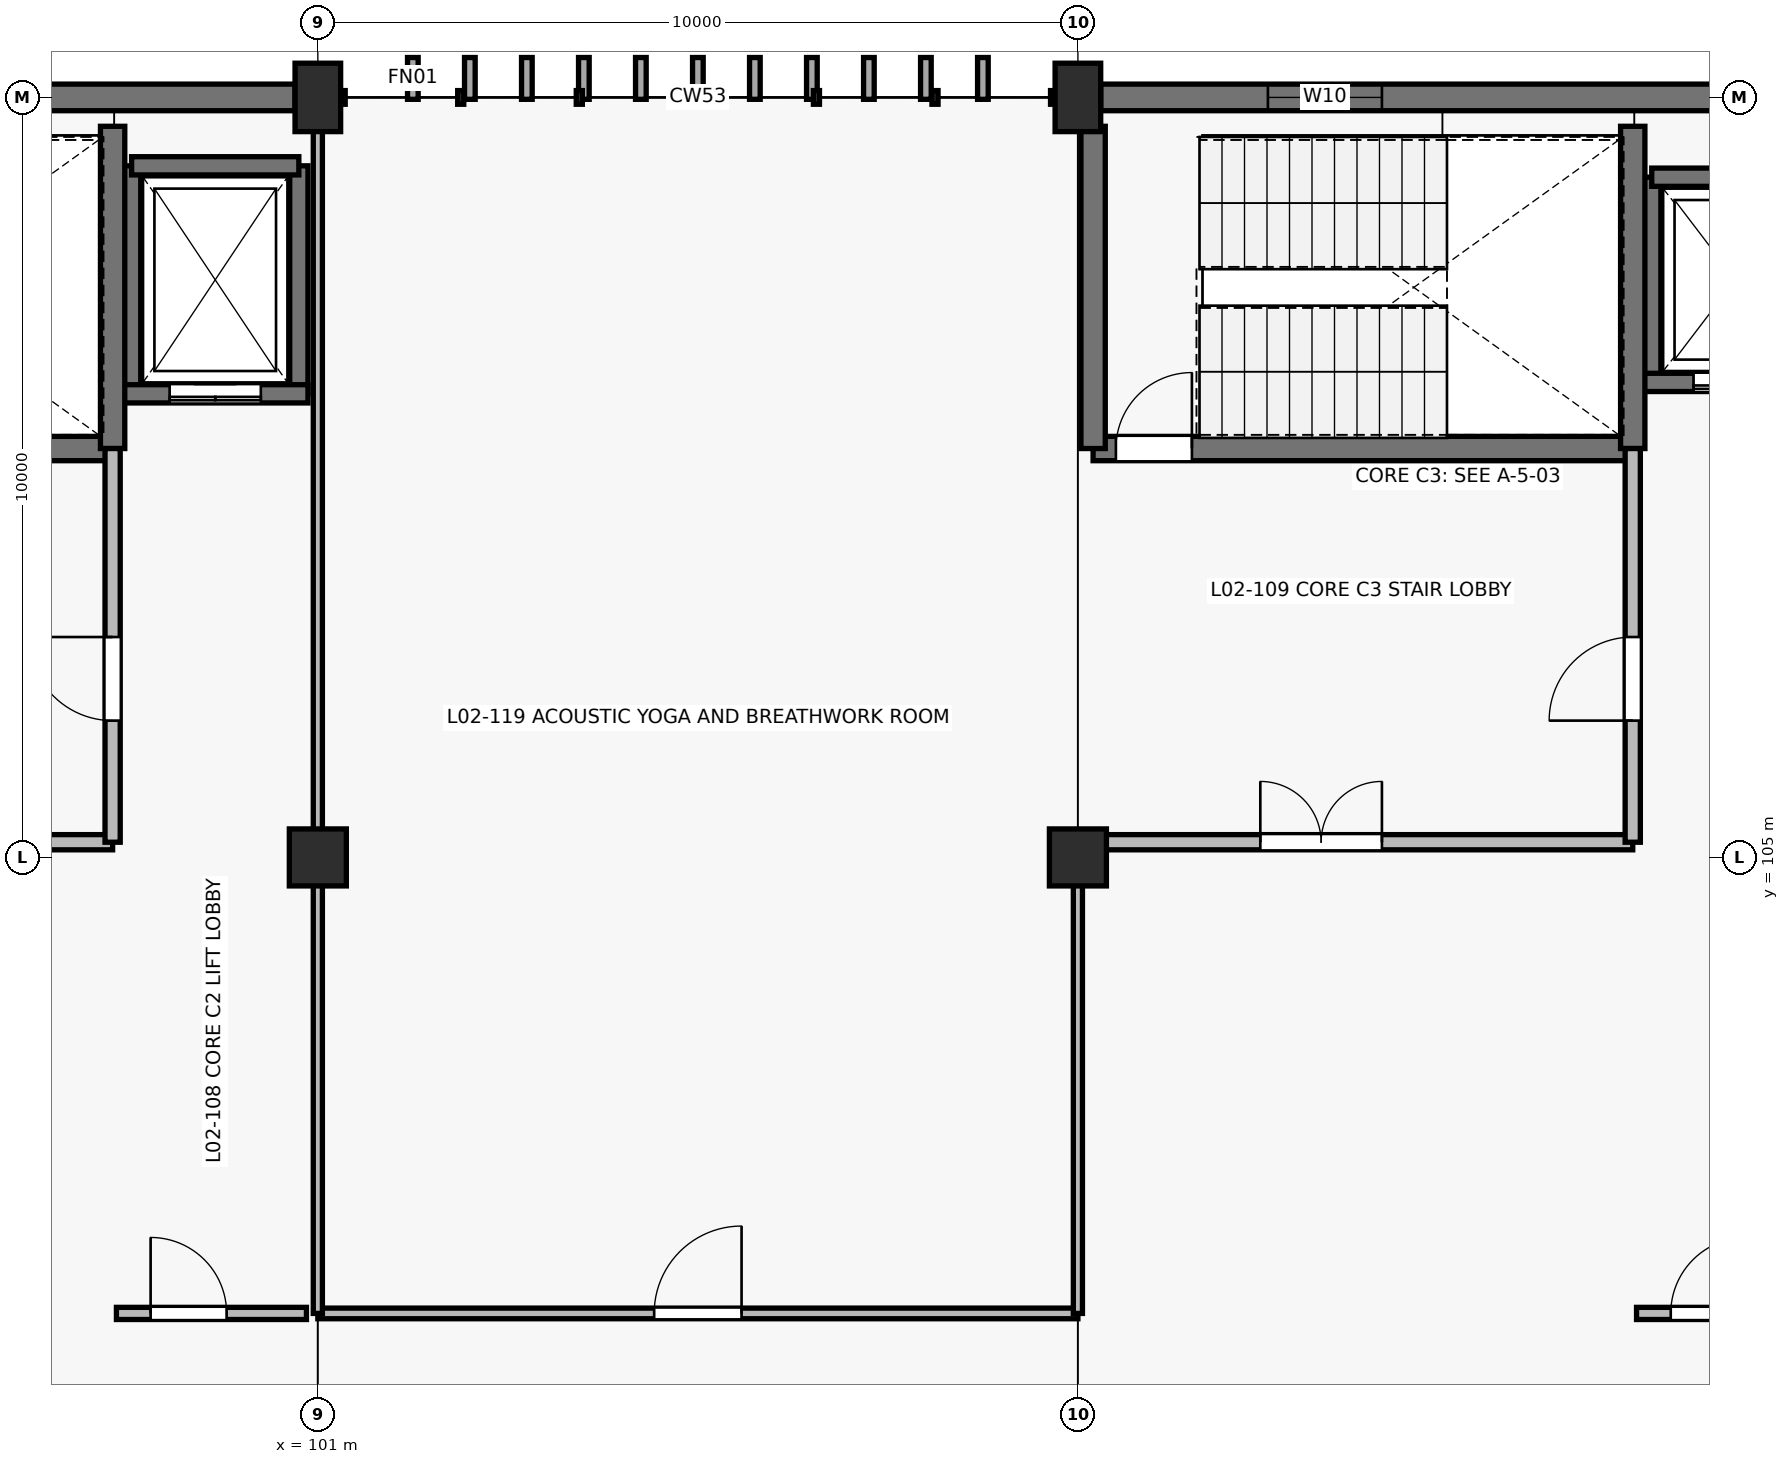
"""IFC4 building model, lengths in metres.
Left out: names, types, materials, properties, quantities, classifications, styles, units other than length and angle.
Written with IfcOpenShell. Run it as: python <this file> out.ifc"""

import sys

from ifc_helpers import new_model, si_unit, direction, frame, frame_2d, origin, origin_2d, place, context, subcontext, project, spatial, rectangle, extrude, element, fill, save


model = new_model("IFC4")
c1 = context("Model", 3, precision=1e-05, world=origin(), true_north=direction((0.0, 1.0)))
c2 = subcontext(c1, "Body", "Model", "MODEL_VIEW")
j1 = project(units=[si_unit("LENGTHUNIT", "METRE"), si_unit("PLANEANGLEUNIT", "RADIAN")], contexts=[c1])
p1 = place(None, origin())
s1 = spatial("IfcSite", under=j1, at=p1, CompositionType="ELEMENT")
p2 = place(p1, origin())
s2 = spatial("IfcBuilding", under=s1, at=p2, CompositionType="ELEMENT")
p3 = place(p2, frame((0.0, 0.0, 9.0)))
s3 = spatial("IfcBuildingStorey", under=s2, at=p3, CompositionType="ELEMENT", Elevation=9.0)
p4 = place(p3, frame((101.0, 105.0, 0.0), z_axis=(0.0, 0.0, 1.0), x_axis=(1.0, 0.0, 0.0)))
e1 = element("IfcColumn", 1, at=p4, inside=s3, PredefinedType="COLUMN", context=c2, shape_type="SweptSolid", body=[
    extrude(rectangle(XDim=0.75, YDim=0.75, at=origin_2d()), origin(), (0.0, 0.0, 1.0), 4.2),
])
p5 = place(p3, frame((101.0, 115.0, 0.0), z_axis=(0.0, 0.0, 1.0), x_axis=(1.0, 0.0, 0.0)))
e2 = element("IfcColumn", 2, at=p5, inside=s3, PredefinedType="COLUMN", context=c2, shape_type="SweptSolid", body=[
    extrude(rectangle(XDim=0.6, YDim=0.9, at=origin_2d()), origin(), (0.0, 0.0, 1.0), 4.2),
])
p6 = place(p3, frame((111.0, 105.0, 0.0), z_axis=(0.0, 0.0, 1.0), x_axis=(1.0, 0.0, 0.0)))
e3 = element("IfcColumn", 3, at=p6, inside=s3, PredefinedType="COLUMN", context=c2, shape_type="SweptSolid", body=[
    extrude(rectangle(XDim=0.75, YDim=0.75, at=origin_2d()), origin(), (0.0, 0.0, 1.0), 4.2),
])
p7 = place(p3, frame((111.0, 115.0, 0.0), z_axis=(0.0, 0.0, 1.0), x_axis=(1.0, 0.0, 0.0)))
e4 = element("IfcColumn", 4, at=p7, inside=s3, PredefinedType="COLUMN", context=c2, shape_type="SweptSolid", body=[
    extrude(rectangle(XDim=0.6, YDim=0.9, at=origin_2d()), origin(), (0.0, 0.0, 1.0), 4.2),
])
p8 = place(p3, frame((91.3, 115.0, 0.0), z_axis=(0.0, 0.0, 1.0), x_axis=(1.0, 0.0, 0.0)))
e5 = element("IfcWall", 5, at=p8, inside=s3, PredefinedType="SOLIDWALL", context=c2, shape_type="SweptSolid", body=[
    extrude(rectangle(XDim=9.4, YDim=0.35, at=frame_2d((4.7, 0.0))), origin(), (0.0, 0.0, 1.0), 4.2),
])
p9 = place(p8, frame((2.2, 0.0, 1.0)))
e6 = element("IfcOpeningElement", 6, at=p9, cuts=e5, PredefinedType="OPENING", context=c2, shape_type="SweptSolid", body=[
    extrude(rectangle(XDim=2.7, YDim=1.5, at=frame_2d((1.35, 0.75))), frame((0.0, 0.185, 0.0), z_axis=(0.0, -1.0, 0.0), x_axis=(1.0, 0.0, 0.0)), (0.0, 0.0, 1.0), 0.37),
])
p10 = place(p3, frame((111.3, 115.0, 0.0), z_axis=(0.0, 0.0, 1.0), x_axis=(1.0, 0.0, 0.0)))
e7 = element("IfcWall", 7, at=p10, inside=s3, PredefinedType="SOLIDWALL", context=c2, shape_type="SweptSolid", body=[
    extrude(rectangle(XDim=9.4, YDim=0.35, at=frame_2d((4.7, 0.0))), origin(), (0.0, 0.0, 1.0), 4.2),
])
p11 = place(p10, frame((2.2, 0.0, 1.0)))
e8 = element("IfcOpeningElement", 8, at=p11, cuts=e7, PredefinedType="OPENING", context=c2, shape_type="SweptSolid", body=[
    extrude(rectangle(XDim=1.5, YDim=1.8, at=frame_2d((0.75, 0.9))), frame((0.0, 0.185, 0.0), z_axis=(0.0, -1.0, 0.0), x_axis=(1.0, 0.0, 0.0)), (0.0, 0.0, 1.0), 0.37),
])
for number, where, z_axis, x_axis in (
    (9, (98.55, 111.1, 0.0), (0.0, 0.0, 1.0), (0.0, 1.0, 0.0)),
    (10, (100.75, 114.1, 0.0), (0.0, 0.0, 1.0), (0.0, -1.0, 0.0)),
):
    element("IfcWall", number, at=place(p3, frame(where, z_axis=z_axis, x_axis=x_axis)), inside=s3, PredefinedType="SHEAR", context=c2, shape_type="SweptSolid", body=[
        extrude(rectangle(XDim=3.0, YDim=0.24, at=frame_2d((1.5, 0.0))), origin(), (0.0, 0.0, 1.0), 4.2),
    ])
p12 = place(p3, frame((98.55, 114.1, 0.0), z_axis=(0.0, 0.0, 1.0), x_axis=(1.0, 0.0, 0.0)))
e11 = element("IfcWall", 11, at=p12, inside=s3, PredefinedType="SHEAR", context=c2, shape_type="SweptSolid", body=[
    extrude(rectangle(XDim=2.2, YDim=0.24, at=frame_2d((1.1, 0.0))), origin(), (0.0, 0.0, 1.0), 4.2),
])
p13 = place(p3, frame((100.87, 111.1, 0.0), z_axis=(0.0, 0.0, 1.0), x_axis=(-1.0, 0.0, 0.0)))
e12 = element("IfcWall", 12, at=p13, inside=s3, PredefinedType="SHEAR", context=c2, shape_type="SweptSolid", body=[
    extrude(rectangle(XDim=2.44, YDim=0.24, at=frame_2d((1.22, 0.0))), origin(), (0.0, 0.0, 1.0), 4.2),
])
p14 = place(p13, frame((0.62, 0.0, 0.0)))
e13 = element("IfcOpeningElement", 13, at=p14, cuts=e12, PredefinedType="OPENING", context=c2, shape_type="SweptSolid", body=[
    extrude(rectangle(XDim=1.2, YDim=2.15, at=frame_2d((0.6, 1.075))), frame((0.0, 0.13, 0.0), z_axis=(0.0, -1.0, 0.0), x_axis=(1.0, 0.0, 0.0)), (0.0, 0.0, 1.0), 0.26),
])
p15 = place(p3, frame((118.55, 111.25, 0.0), z_axis=(0.0, 0.0, 1.0), x_axis=(0.0, 1.0, 0.0)))
e14 = element("IfcWall", 14, at=p15, inside=s3, PredefinedType="SHEAR", context=c2, shape_type="SweptSolid", body=[
    extrude(rectangle(XDim=2.7, YDim=0.24, at=frame_2d((1.35, 0.0))), origin(), (0.0, 0.0, 1.0), 4.2),
])
p16 = place(p3, frame((118.55, 113.95, 0.0), z_axis=(0.0, 0.0, 1.0), x_axis=(1.0, 0.0, 0.0)))
e15 = element("IfcWall", 15, at=p16, inside=s3, PredefinedType="SHEAR", context=c2, shape_type="SweptSolid", body=[
    extrude(rectangle(XDim=2.2, YDim=0.24, at=frame_2d((1.1, 0.0))), origin(), (0.0, 0.0, 1.0), 4.2),
])
p17 = place(p3, frame((120.87, 111.25, 0.0), z_axis=(0.0, 0.0, 1.0), x_axis=(-1.0, 0.0, 0.0)))
e16 = element("IfcWall", 16, at=p17, inside=s3, PredefinedType="SHEAR", context=c2, shape_type="SweptSolid", body=[
    extrude(rectangle(XDim=2.44, YDim=0.24, at=frame_2d((1.22, 0.0))), origin(), (0.0, 0.0, 1.0), 4.2),
])
p18 = place(p17, frame((0.67, 0.0, 0.0)))
e17 = element("IfcOpeningElement", 17, at=p18, cuts=e16, PredefinedType="OPENING", context=c2, shape_type="SweptSolid", body=[
    extrude(rectangle(XDim=1.1, YDim=2.15, at=frame_2d((0.55, 1.075))), frame((0.0, 0.13, 0.0), z_axis=(0.0, -1.0, 0.0), x_axis=(1.0, 0.0, 0.0)), (0.0, 0.0, 1.0), 0.26),
])
p19 = place(p3, frame((91.2, 110.38, 0.0), z_axis=(0.0, 0.0, 1.0), x_axis=(1.0, 0.0, 0.0)))
e18 = element("IfcWall", 18, at=p19, inside=s3, PredefinedType="SHEAR", context=c2, shape_type="SweptSolid", body=[
    extrude(rectangle(XDim=7.1, YDim=0.32, at=frame_2d((3.55, 0.0))), origin(), (0.0, 0.0, 1.0), 4.2),
])
p20 = place(p19, frame((0.3, 0.0, 0.0)))
e19 = element("IfcOpeningElement", 19, at=p20, cuts=e18, PredefinedType="OPENING", context=c2, shape_type="SweptSolid", body=[
    extrude(rectangle(XDim=1.0, YDim=2.15, at=frame_2d((0.5, 1.075))), frame((0.0, 0.17, 0.0), z_axis=(0.0, -1.0, 0.0), x_axis=(1.0, 0.0, 0.0)), (0.0, 0.0, 1.0), 0.34),
])
p21 = place(p3, frame((98.3, 110.38, 0.0), z_axis=(0.0, 0.0, 1.0), x_axis=(0.0, 1.0, 0.0)))
e20 = element("IfcWall", 20, at=p21, inside=s3, PredefinedType="SHEAR", context=c2, shape_type="SweptSolid", body=[
    extrude(rectangle(XDim=4.24, YDim=0.32, at=frame_2d((2.12, 0.0))), origin(), (0.0, 0.0, 1.0), 4.2),
])
p22 = place(p3, frame((91.2, 105.2, 0.0), z_axis=(0.0, 0.0, 1.0), x_axis=(1.0, 0.0, 0.0)))
e21 = element("IfcWall", 21, at=p22, inside=s3, PredefinedType="PARTITIONING", context=c2, shape_type="SweptSolid", body=[
    extrude(rectangle(XDim=7.1, YDim=0.2, at=frame_2d((3.55, 0.0))), origin(), (0.0, 0.0, 1.0), 2.905),
])
p23 = place(p22, frame((2.2, 0.0, 0.0)))
e22 = element("IfcOpeningElement", 22, at=p23, cuts=e21, PredefinedType="OPENING", context=c2, shape_type="SweptSolid", body=[
    extrude(rectangle(XDim=1.6, YDim=2.2, at=frame_2d((0.8, 1.1))), frame((0.0, 0.11, 0.0), z_axis=(0.0, -1.0, 0.0), x_axis=(1.0, 0.0, 0.0)), (0.0, 0.0, 1.0), 0.22),
])
p24 = place(p3, frame((98.3, 105.2, 0.0), z_axis=(0.0, 0.0, 1.0), x_axis=(0.0, 1.0, 0.0)))
e23 = element("IfcWall", 23, at=p24, inside=s3, PredefinedType="PARTITIONING", context=c2, shape_type="SweptSolid", body=[
    extrude(rectangle(XDim=5.18, YDim=0.2, at=frame_2d((2.59, 0.0))), origin(), (0.0, 0.0, 1.0), 3.005),
])
p25 = place(p24, frame((1.6, 0.0, 0.0)))
e24 = element("IfcOpeningElement", 24, at=p25, cuts=e23, PredefinedType="OPENING", context=c2, shape_type="SweptSolid", body=[
    extrude(rectangle(XDim=1.1, YDim=2.15, at=frame_2d((0.55, 1.075))), frame((0.0, 0.11, 0.0), z_axis=(0.0, -1.0, 0.0), x_axis=(1.0, 0.0, 0.0)), (0.0, 0.0, 1.0), 0.22),
])
p26 = place(p3, frame((98.35, 99.0, 0.0), z_axis=(0.0, 0.0, 1.0), x_axis=(1.0, 0.0, 0.0)))
e25 = element("IfcWall", 25, at=p26, inside=s3, PredefinedType="PARTITIONING", context=c2, shape_type="SweptSolid", body=[
    extrude(rectangle(XDim=2.5, YDim=0.16, at=frame_2d((1.25, 0.0))), origin(), (0.0, 0.0, 1.0), 2.905),
])
p27 = place(p26, frame((0.45, 0.0, 0.0)))
e26 = element("IfcOpeningElement", 26, at=p27, cuts=e25, PredefinedType="OPENING", context=c2, shape_type="SweptSolid", body=[
    extrude(rectangle(XDim=1.0, YDim=2.15, at=frame_2d((0.5, 1.075))), frame((0.0, 0.09, 0.0), z_axis=(0.0, -1.0, 0.0), x_axis=(1.0, 0.0, 0.0)), (0.0, 0.0, 1.0), 0.18),
])
p28 = place(p3, frame((111.2, 110.38, 0.0), z_axis=(0.0, 0.0, 1.0), x_axis=(1.0, 0.0, 0.0)))
e27 = element("IfcWall", 27, at=p28, inside=s3, PredefinedType="SHEAR", context=c2, shape_type="SweptSolid", body=[
    extrude(rectangle(XDim=7.1, YDim=0.32, at=frame_2d((3.55, 0.0))), origin(), (0.0, 0.0, 1.0), 4.2),
])
p29 = place(p28, frame((0.3, 0.0, 0.0)))
e28 = element("IfcOpeningElement", 28, at=p29, cuts=e27, PredefinedType="OPENING", context=c2, shape_type="SweptSolid", body=[
    extrude(rectangle(XDim=1.0, YDim=2.15, at=frame_2d((0.5, 1.075))), frame((0.0, 0.17, 0.0), z_axis=(0.0, -1.0, 0.0), x_axis=(1.0, 0.0, 0.0)), (0.0, 0.0, 1.0), 0.34),
])
for number, where, z_axis, x_axis in (
    (29, (118.3, 110.38, 0.0), (0.0, 0.0, 1.0), (0.0, 1.0, 0.0)),
    (30, (111.2, 114.62, 0.0), (0.0, 0.0, 1.0), (0.0, -1.0, 0.0)),
):
    element("IfcWall", number, at=place(p3, frame(where, z_axis=z_axis, x_axis=x_axis)), inside=s3, PredefinedType="SHEAR", context=c2, shape_type="SweptSolid", body=[
        extrude(rectangle(XDim=4.24, YDim=0.32, at=frame_2d((2.12, 0.0))), origin(), (0.0, 0.0, 1.0), 4.2),
    ])
p30 = place(p3, frame((111.2, 105.2, 0.0), z_axis=(0.0, 0.0, 1.0), x_axis=(1.0, 0.0, 0.0)))
e31 = element("IfcWall", 31, at=p30, inside=s3, PredefinedType="PARTITIONING", context=c2, shape_type="SweptSolid", body=[
    extrude(rectangle(XDim=7.1, YDim=0.2, at=frame_2d((3.55, 0.0))), origin(), (0.0, 0.0, 1.0), 2.905),
])
p31 = place(p30, frame((2.2, 0.0, 0.0)))
e32 = element("IfcOpeningElement", 32, at=p31, cuts=e31, PredefinedType="OPENING", context=c2, shape_type="SweptSolid", body=[
    extrude(rectangle(XDim=1.6, YDim=2.2, at=frame_2d((0.8, 1.1))), frame((0.0, 0.11, 0.0), z_axis=(0.0, -1.0, 0.0), x_axis=(1.0, 0.0, 0.0)), (0.0, 0.0, 1.0), 0.22),
])
p32 = place(p3, frame((118.3, 105.2, 0.0), z_axis=(0.0, 0.0, 1.0), x_axis=(0.0, 1.0, 0.0)))
e33 = element("IfcWall", 33, at=p32, inside=s3, PredefinedType="PARTITIONING", context=c2, shape_type="SweptSolid", body=[
    extrude(rectangle(XDim=5.18, YDim=0.2, at=frame_2d((2.59, 0.0))), origin(), (0.0, 0.0, 1.0), 3.005),
])
p33 = place(p32, frame((1.6, 0.0, 0.0)))
e34 = element("IfcOpeningElement", 34, at=p33, cuts=e33, PredefinedType="OPENING", context=c2, shape_type="SweptSolid", body=[
    extrude(rectangle(XDim=1.1, YDim=2.15, at=frame_2d((0.55, 1.075))), frame((0.0, 0.11, 0.0), z_axis=(0.0, -1.0, 0.0), x_axis=(1.0, 0.0, 0.0)), (0.0, 0.0, 1.0), 0.22),
])
p34 = place(p3, frame((118.35, 99.0, 0.0), z_axis=(0.0, 0.0, 1.0), x_axis=(1.0, 0.0, 0.0)))
e35 = element("IfcWall", 35, at=p34, inside=s3, PredefinedType="PARTITIONING", context=c2, shape_type="SweptSolid", body=[
    extrude(rectangle(XDim=2.5, YDim=0.16, at=frame_2d((1.25, 0.0))), origin(), (0.0, 0.0, 1.0), 2.905),
])
p35 = place(p34, frame((0.45, 0.0, 0.0)))
e36 = element("IfcOpeningElement", 36, at=p35, cuts=e35, PredefinedType="OPENING", context=c2, shape_type="SweptSolid", body=[
    extrude(rectangle(XDim=1.0, YDim=2.15, at=frame_2d((0.5, 1.075))), frame((0.0, 0.09, 0.0), z_axis=(0.0, -1.0, 0.0), x_axis=(1.0, 0.0, 0.0)), (0.0, 0.0, 1.0), 0.18),
])
p36 = place(p3, frame((101.0, 99.0, 0.0), z_axis=(0.0, 0.0, 1.0), x_axis=(1.0, 0.0, 0.0)))
e37 = element("IfcWall", 37, at=p36, inside=s3, PredefinedType="PARTITIONING", context=c2, shape_type="SweptSolid", body=[
    extrude(rectangle(XDim=10.0, YDim=0.14, at=frame_2d((5.0, 0.0))), origin(), (0.0, 0.0, 1.0), 2.905),
])
p37 = place(p36, frame((4.425, 0.0, 0.0)))
e38 = element("IfcOpeningElement", 38, at=p37, cuts=e37, PredefinedType="OPENING", context=c2, shape_type="SweptSolid", body=[
    extrude(rectangle(XDim=1.15, YDim=2.15, at=frame_2d((0.575, 1.075))), frame((0.0, 0.08, 0.0), z_axis=(0.0, -1.0, 0.0), x_axis=(1.0, 0.0, 0.0)), (0.0, 0.0, 1.0), 0.16),
])
p38 = place(p3, frame((101.0, 99.0, 0.0), z_axis=(0.0, 0.0, 1.0), x_axis=(0.0, 1.0, 0.0)))
e39 = element("IfcWall", 39, at=p38, inside=s3, PredefinedType="PARTITIONING", context=c2, shape_type="SweptSolid", body=[
    extrude(rectangle(XDim=15.75, YDim=0.12, at=frame_2d((7.875, 0.0))), origin(), (0.0, 0.0, 1.0), 2.905),
])
p39 = place(p3, frame((111.0, 99.0, 0.0), z_axis=(0.0, 0.0, 1.0), x_axis=(0.0, 1.0, 0.0)))
e40 = element("IfcWall", 40, at=p39, inside=s3, PredefinedType="PARTITIONING", context=c2, shape_type="SweptSolid", body=[
    extrude(rectangle(XDim=6.2, YDim=0.12, at=frame_2d((3.1, 0.0))), origin(), (0.0, 0.0, 1.0), 2.905),
])
p40 = place(p11, origin())
e41 = element("IfcWindow", 41, at=p40, inside=s3, PartitioningType="SINGLE_PANEL", PredefinedType="WINDOW", context=c2, shape_type="SweptSolid", body=[
    extrude(rectangle(XDim=1.5, YDim=1.8, at=frame_2d((0.75, 0.9))), frame((0.0, 0.03, 0.0), z_axis=(0.0, -1.0, 0.0), x_axis=(1.0, 0.0, 0.0)), (0.0, 0.0, 1.0), 0.06),
])
fill(e8, e41)
p41 = place(p14, origin())
e42 = element("IfcDoor", 42, at=p41, inside=s3, OperationType="DOUBLE_DOOR_SLIDING", PredefinedType="USERDEFINED", context=c2, shape_type="SweptSolid", body=[
    extrude(rectangle(XDim=1.2, YDim=2.15, at=frame_2d((0.6, 1.075))), frame((0.0, 0.025, 0.0), z_axis=(0.0, -1.0, 0.0), x_axis=(1.0, 0.0, 0.0)), (0.0, 0.0, 1.0), 0.05),
])
fill(e13, e42)
p42 = place(p18, origin())
e43 = element("IfcDoor", 43, at=p42, inside=s3, OperationType="DOUBLE_DOOR_SLIDING", PredefinedType="USERDEFINED", context=c2, shape_type="SweptSolid", body=[
    extrude(rectangle(XDim=1.1, YDim=2.15, at=frame_2d((0.55, 1.075))), frame((0.0, 0.025, 0.0), z_axis=(0.0, -1.0, 0.0), x_axis=(1.0, 0.0, 0.0)), (0.0, 0.0, 1.0), 0.05),
])
fill(e17, e43)
p43 = place(p25, origin())
e44 = element("IfcDoor", 44, at=p43, inside=s3, OperationType="SINGLE_SWING_RIGHT", PredefinedType="DOOR", context=c2, shape_type="SweptSolid", body=[
    extrude(rectangle(XDim=1.1, YDim=2.15, at=frame_2d((0.55, 1.075))), frame((0.0, 0.025, 0.0), z_axis=(0.0, -1.0, 0.0), x_axis=(1.0, 0.0, 0.0)), (0.0, 0.0, 1.0), 0.05),
])
fill(e24, e44)
p44 = place(p27, origin())
e45 = element("IfcDoor", 45, at=p44, inside=s3, OperationType="SINGLE_SWING_LEFT", PredefinedType="DOOR", context=c2, shape_type="SweptSolid", body=[
    extrude(rectangle(XDim=1.0, YDim=2.15, at=frame_2d((0.5, 1.075))), frame((0.0, 0.025, 0.0), z_axis=(0.0, -1.0, 0.0), x_axis=(1.0, 0.0, 0.0)), (0.0, 0.0, 1.0), 0.05),
])
fill(e26, e45)
p45 = place(p29, origin())
e46 = element("IfcDoor", 46, at=p45, inside=s3, OperationType="SINGLE_SWING_RIGHT", PredefinedType="DOOR", context=c2, shape_type="SweptSolid", body=[
    extrude(rectangle(XDim=1.0, YDim=2.15, at=frame_2d((0.5, 1.075))), frame((0.0, 0.025, 0.0), z_axis=(0.0, -1.0, 0.0), x_axis=(1.0, 0.0, 0.0)), (0.0, 0.0, 1.0), 0.05),
])
fill(e28, e46)
p46 = place(p31, origin())
e47 = element("IfcDoor", 47, at=p46, inside=s3, OperationType="DOUBLE_DOOR_SINGLE_SWING", PredefinedType="DOOR", context=c2, shape_type="SweptSolid", body=[
    extrude(rectangle(XDim=1.6, YDim=2.2, at=frame_2d((0.8, 1.1))), frame((0.0, 0.025, 0.0), z_axis=(0.0, -1.0, 0.0), x_axis=(1.0, 0.0, 0.0)), (0.0, 0.0, 1.0), 0.05),
])
fill(e32, e47)
p47 = place(p33, origin())
e48 = element("IfcDoor", 48, at=p47, inside=s3, OperationType="SINGLE_SWING_LEFT", PredefinedType="DOOR", context=c2, shape_type="SweptSolid", body=[
    extrude(rectangle(XDim=1.1, YDim=2.15, at=frame_2d((0.55, 1.075))), frame((0.0, 0.025, 0.0), z_axis=(0.0, -1.0, 0.0), x_axis=(1.0, 0.0, 0.0)), (0.0, 0.0, 1.0), 0.05),
])
fill(e34, e48)
p48 = place(p35, origin())
e49 = element("IfcDoor", 49, at=p48, inside=s3, OperationType="SINGLE_SWING_RIGHT", PredefinedType="DOOR", context=c2, shape_type="SweptSolid", body=[
    extrude(rectangle(XDim=1.0, YDim=2.15, at=frame_2d((0.5, 1.075))), frame((0.0, 0.025, 0.0), z_axis=(0.0, -1.0, 0.0), x_axis=(1.0, 0.0, 0.0)), (0.0, 0.0, 1.0), 0.05),
])
fill(e36, e49)
p49 = place(p37, origin())
e50 = element("IfcDoor", 50, at=p49, inside=s3, OperationType="SINGLE_SWING_RIGHT", PredefinedType="DOOR", context=c2, shape_type="SweptSolid", body=[
    extrude(rectangle(XDim=1.15, YDim=2.15, at=frame_2d((0.575, 1.075))), frame((0.0, 0.025, 0.0), z_axis=(0.0, -1.0, 0.0), x_axis=(1.0, 0.0, 0.0)), (0.0, 0.0, 1.0), 0.05),
])
fill(e38, e50)
save(model, sys.argv[1])
